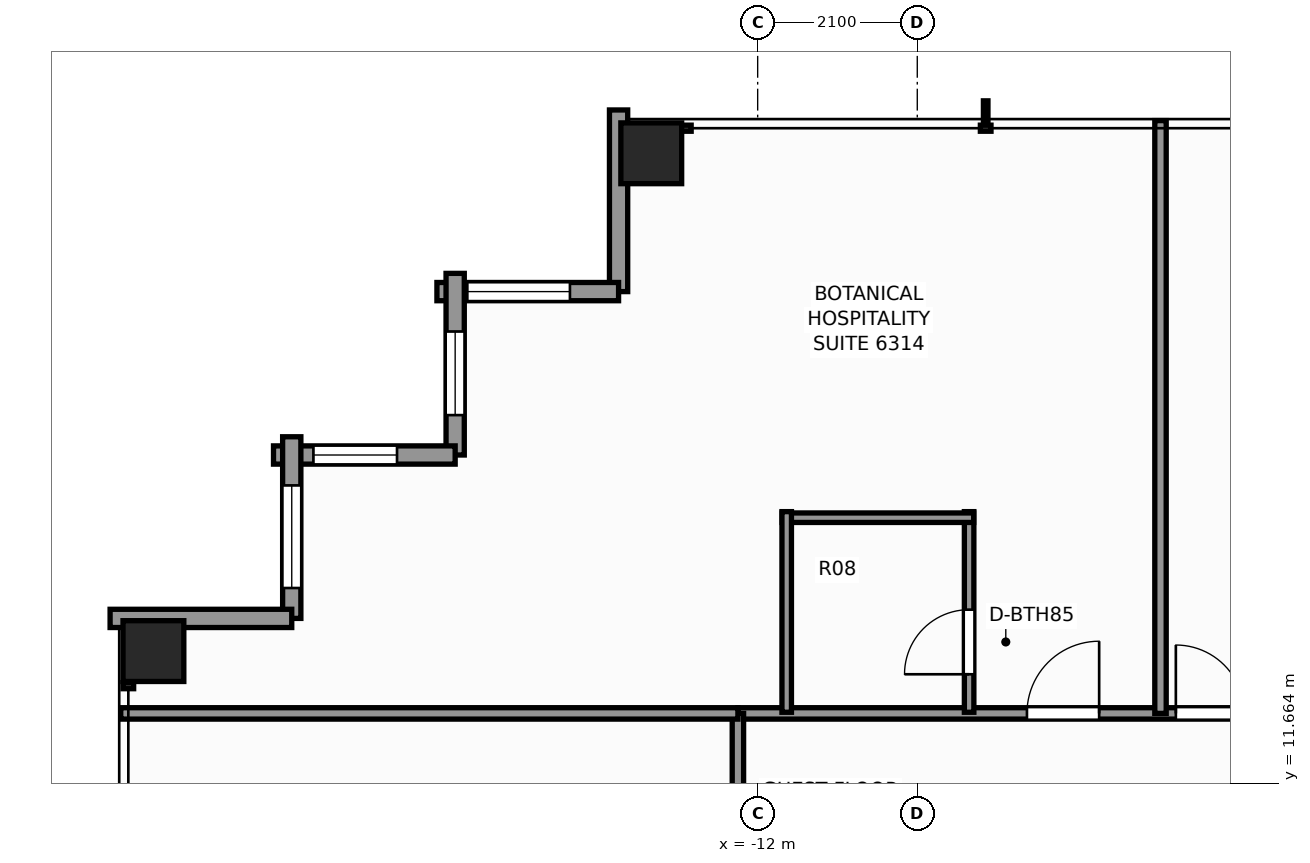
"""IFC4 building model, lengths in metres.
Left out: names, types, materials, properties, quantities, classifications, styles, units other than length and angle.
Written with IfcOpenShell. Run it as: python <this file> out.ifc"""

import sys

from ifc_helpers import new_model, si_unit, direction, frame, frame_2d, origin, origin_2d, place, context, subcontext, project, spatial, rectangle, extrude, element, fill, save


model = new_model("IFC4")
c1 = context("Model", 3, precision=1e-05, world=origin(), true_north=direction((0.0, 1.0)))
c2 = subcontext(c1, "Body", "Model", "MODEL_VIEW")
j1 = project(units=[si_unit("LENGTHUNIT", "METRE"), si_unit("PLANEANGLEUNIT", "RADIAN")], contexts=[c1])
p1 = place(None, origin())
s1 = spatial("IfcSite", under=j1, at=p1, CompositionType="ELEMENT")
p2 = place(p1, origin())
s2 = spatial("IfcBuilding", under=s1, at=p2, CompositionType="ELEMENT")
p3 = place(p2, frame((0.0, 0.0, 216.3)))
s3 = spatial("IfcBuildingStorey", under=s2, at=p3, CompositionType="ELEMENT", Elevation=216.3)
for number, where, z_axis, x_axis in (
    (1, (-13.4, 19.95, 0.0), (0.0, 0.0, 1.0), (1.0, 0.0, 0.0)),
    (2, (-19.95, 13.4, 0.0), (0.0, 0.0, 1.0), (1.0, 0.0, 0.0)),
):
    element("IfcColumn", number, at=place(p3, frame(where, z_axis=z_axis, x_axis=x_axis)), inside=s3, PredefinedType="COLUMN", context=c2, shape_type="SweptSolid", body=[
        extrude(rectangle(XDim=0.8, YDim=0.8, at=origin_2d()), origin(), (0.0, 0.0, 1.0), 3.3),
    ])
p4 = place(p3, frame((-13.83, 18.13, 0.0), z_axis=(0.0, 0.0, 1.0), x_axis=(0.0, 1.0, 0.0)))
e3 = element("IfcWall", 3, at=p4, inside=s3, PredefinedType="STANDARD", context=c2, shape_type="SweptSolid", body=[
    extrude(rectangle(XDim=2.39, YDim=0.24, at=frame_2d((1.195, 0.0))), origin(), (0.0, 0.0, 1.0), 2.463),
])
p5 = place(p3, frame((-16.22, 18.13, 0.0), z_axis=(0.0, 0.0, 1.0), x_axis=(1.0, 0.0, 0.0)))
e4 = element("IfcWall", 4, at=p5, inside=s3, PredefinedType="STANDARD", context=c2, shape_type="SweptSolid", body=[
    extrude(rectangle(XDim=2.39, YDim=0.24, at=frame_2d((1.195, 0.0))), origin(), (0.0, 0.0, 1.0), 2.463),
])
p6 = place(p5, frame((0.4, 0.0, 0.65)))
e5 = element("IfcOpeningElement", 5, at=p6, cuts=e4, PredefinedType="OPENING", context=c2, shape_type="SweptSolid", body=[
    extrude(rectangle(XDim=1.35, YDim=1.55, at=frame_2d((0.675, 0.775))), frame((0.0, 0.13, 0.0), z_axis=(0.0, -1.0, 0.0), x_axis=(1.0, 0.0, 0.0)), (0.0, 0.0, 1.0), 0.26),
])
p7 = place(p3, frame((-15.98, 15.98, 0.0), z_axis=(0.0, 0.0, 1.0), x_axis=(0.0, 1.0, 0.0)))
e6 = element("IfcWall", 6, at=p7, inside=s3, PredefinedType="STANDARD", context=c2, shape_type="SweptSolid", body=[
    extrude(rectangle(XDim=2.39, YDim=0.24, at=frame_2d((1.195, 0.0))), origin(), (0.0, 0.0, 1.0), 2.463),
])
p8 = place(p7, frame((0.525, 0.0, 0.65)))
e7 = element("IfcOpeningElement", 7, at=p8, cuts=e6, PredefinedType="OPENING", context=c2, shape_type="SweptSolid", body=[
    extrude(rectangle(XDim=1.1, YDim=1.45, at=frame_2d((0.55, 0.725))), frame((0.0, 0.13, 0.0), z_axis=(0.0, -1.0, 0.0), x_axis=(1.0, 0.0, 0.0)), (0.0, 0.0, 1.0), 0.26),
])
p9 = place(p3, frame((-18.37, 15.98, 0.0), z_axis=(0.0, 0.0, 1.0), x_axis=(1.0, 0.0, 0.0)))
e8 = element("IfcWall", 8, at=p9, inside=s3, PredefinedType="STANDARD", context=c2, shape_type="SweptSolid", body=[
    extrude(rectangle(XDim=2.39, YDim=0.24, at=frame_2d((1.195, 0.0))), origin(), (0.0, 0.0, 1.0), 2.463),
])
p10 = place(p9, frame((0.525, 0.0, 0.65)))
e9 = element("IfcOpeningElement", 9, at=p10, cuts=e8, PredefinedType="OPENING", context=c2, shape_type="SweptSolid", body=[
    extrude(rectangle(XDim=1.1, YDim=1.45, at=frame_2d((0.55, 0.725))), frame((0.0, 0.13, 0.0), z_axis=(0.0, -1.0, 0.0), x_axis=(1.0, 0.0, 0.0)), (0.0, 0.0, 1.0), 0.26),
])
p11 = place(p3, frame((-18.13, 13.83, 0.0), z_axis=(0.0, 0.0, 1.0), x_axis=(0.0, 1.0, 0.0)))
e10 = element("IfcWall", 10, at=p11, inside=s3, PredefinedType="STANDARD", context=c2, shape_type="SweptSolid", body=[
    extrude(rectangle(XDim=2.39, YDim=0.24, at=frame_2d((1.195, 0.0))), origin(), (0.0, 0.0, 1.0), 2.463),
])
p12 = place(p11, frame((0.4, 0.0, 0.65)))
e11 = element("IfcOpeningElement", 11, at=p12, cuts=e10, PredefinedType="OPENING", context=c2, shape_type="SweptSolid", body=[
    extrude(rectangle(XDim=1.35, YDim=1.55, at=frame_2d((0.675, 0.775))), frame((0.0, 0.13, 0.0), z_axis=(0.0, -1.0, 0.0), x_axis=(1.0, 0.0, 0.0)), (0.0, 0.0, 1.0), 0.26),
])
p13 = place(p3, frame((-20.52, 13.83, 0.0), z_axis=(0.0, 0.0, 1.0), x_axis=(1.0, 0.0, 0.0)))
e12 = element("IfcWall", 12, at=p13, inside=s3, PredefinedType="STANDARD", context=c2, shape_type="SweptSolid", body=[
    extrude(rectangle(XDim=2.39, YDim=0.24, at=frame_2d((1.195, 0.0))), origin(), (0.0, 0.0, 1.0), 2.463),
])
p14 = place(p3, frame((-12.26, 12.58, 0.0), z_axis=(0.0, 0.0, 1.0), x_axis=(1.0, 0.0, 0.0)))
e13 = element("IfcWall", 13, at=p14, inside=s3, PredefinedType="PARTITIONING", context=c2, shape_type="SweptSolid", body=[
    extrude(rectangle(XDim=24.52, YDim=0.15, at=frame_2d((12.26, 0.0))), origin(), (0.0, 0.0, 1.0), 2.369),
])
p15 = place(p14, frame((3.803, 0.0, 0.0)))
e14 = element("IfcOpeningElement", 14, at=p15, cuts=e13, PredefinedType="OPENING", context=c2, shape_type="SweptSolid", body=[
    extrude(rectangle(XDim=0.95, YDim=2.06, at=frame_2d((0.475, 1.03))), frame((0.0, 0.085, 0.0), z_axis=(0.0, -1.0, 0.0), x_axis=(1.0, 0.0, 0.0)), (0.0, 0.0, 1.0), 0.17),
])
p16 = place(p14, frame((5.762, 0.0, 0.0)))
e15 = element("IfcOpeningElement", 15, at=p16, cuts=e13, PredefinedType="OPENING", context=c2, shape_type="SweptSolid", body=[
    extrude(rectangle(XDim=0.9, YDim=2.06, at=frame_2d((0.45, 1.03))), frame((0.0, 0.085, 0.0), z_axis=(0.0, -1.0, 0.0), x_axis=(1.0, 0.0, 0.0)), (0.0, 0.0, 1.0), 0.17),
])
p17 = place(p14, frame((13.518, 0.0, 0.0)))
e16 = element("IfcOpeningElement", 16, at=p17, cuts=e13, PredefinedType="OPENING", context=c2, shape_type="SweptSolid", body=[
    extrude(rectangle(XDim=0.95, YDim=2.06, at=frame_2d((0.475, 1.03))), frame((0.0, 0.085, 0.0), z_axis=(0.0, -1.0, 0.0), x_axis=(1.0, 0.0, 0.0)), (0.0, 0.0, 1.0), 0.17),
])
p18 = place(p14, frame((17.858, 0.0, 0.0)))
e17 = element("IfcOpeningElement", 17, at=p18, cuts=e13, PredefinedType="OPENING", context=c2, shape_type="SweptSolid", body=[
    extrude(rectangle(XDim=0.9, YDim=2.06, at=frame_2d((0.45, 1.03))), frame((0.0, 0.085, 0.0), z_axis=(0.0, -1.0, 0.0), x_axis=(1.0, 0.0, 0.0)), (0.0, 0.0, 1.0), 0.17),
])
p19 = place(p14, frame((19.767, 0.0, 0.0)))
e18 = element("IfcOpeningElement", 18, at=p19, cuts=e13, PredefinedType="OPENING", context=c2, shape_type="SweptSolid", body=[
    extrude(rectangle(XDim=0.95, YDim=2.06, at=frame_2d((0.475, 1.03))), frame((0.0, 0.085, 0.0), z_axis=(0.0, -1.0, 0.0), x_axis=(1.0, 0.0, 0.0)), (0.0, 0.0, 1.0), 0.17),
])
p20 = place(p3, frame((-12.26, -12.26, 0.0), z_axis=(0.0, 0.0, 1.0), x_axis=(0.0, 1.0, 0.0)))
e19 = element("IfcWall", 19, at=p20, inside=s3, PredefinedType="PARTITIONING", context=c2, shape_type="SweptSolid", body=[
    extrude(rectangle(XDim=24.84, YDim=0.15, at=frame_2d((12.42, 0.0))), origin(), (0.0, 0.0, 1.0), 2.369),
])
p21 = place(p20, frame((2.944, 0.0, 0.0)))
e20 = element("IfcOpeningElement", 20, at=p21, cuts=e19, PredefinedType="OPENING", context=c2, shape_type="SweptSolid", body=[
    extrude(rectangle(XDim=0.9, YDim=2.06, at=frame_2d((0.45, 1.03))), frame((0.0, 0.085, 0.0), z_axis=(0.0, -1.0, 0.0), x_axis=(1.0, 0.0, 0.0)), (0.0, 0.0, 1.0), 0.17),
])
p22 = place(p20, frame((4.832, 0.0, 0.0)))
e21 = element("IfcOpeningElement", 21, at=p22, cuts=e19, PredefinedType="OPENING", context=c2, shape_type="SweptSolid", body=[
    extrude(rectangle(XDim=0.95, YDim=2.06, at=frame_2d((0.475, 1.03))), frame((0.0, 0.085, 0.0), z_axis=(0.0, -1.0, 0.0), x_axis=(1.0, 0.0, 0.0)), (0.0, 0.0, 1.0), 0.17),
])
p23 = place(p20, frame((14.418, 0.0, 0.0)))
e22 = element("IfcOpeningElement", 22, at=p23, cuts=e19, PredefinedType="OPENING", context=c2, shape_type="SweptSolid", body=[
    extrude(rectangle(XDim=0.95, YDim=2.06, at=frame_2d((0.475, 1.03))), frame((0.0, 0.085, 0.0), z_axis=(0.0, -1.0, 0.0), x_axis=(1.0, 0.0, 0.0)), (0.0, 0.0, 1.0), 0.17),
])
p24 = place(p20, frame((20.492, 0.0, 0.0)))
e23 = element("IfcOpeningElement", 23, at=p24, cuts=e19, PredefinedType="OPENING", context=c2, shape_type="SweptSolid", body=[
    extrude(rectangle(XDim=0.95, YDim=2.06, at=frame_2d((0.475, 1.03))), frame((0.0, 0.085, 0.0), z_axis=(0.0, -1.0, 0.0), x_axis=(1.0, 0.0, 0.0)), (0.0, 0.0, 1.0), 0.17),
])
p25 = place(p3, frame((-20.38, 12.58, 0.0), z_axis=(0.0, 0.0, 1.0), x_axis=(1.0, 0.0, 0.0)))
e24 = element("IfcWall", 24, at=p25, inside=s3, PredefinedType="PARTITIONING", context=c2, shape_type="SweptSolid", body=[
    extrude(rectangle(XDim=8.12, YDim=0.15, at=frame_2d((4.06, 0.0))), origin(), (0.0, 0.0, 1.0), 2.369),
])
p26 = place(p3, frame((-6.7, 12.58, 0.0), z_axis=(0.0, 0.0, 1.0), x_axis=(0.0, 1.0, 0.0)))
e25 = element("IfcWall", 25, at=p26, inside=s3, PredefinedType="PARTITIONING", context=c2, shape_type="SweptSolid", body=[
    extrude(rectangle(XDim=7.8, YDim=0.15, at=frame_2d((3.9, 0.0))), origin(), (0.0, 0.0, 1.0), 2.453),
])
p27 = place(p3, frame((-9.218, 12.595, 0.0), z_axis=(0.0, 0.0, 1.0), x_axis=(0.0, 1.0, 0.0)))
e26 = element("IfcWall", 26, at=p27, inside=s3, PredefinedType="PARTITIONING", context=c2, shape_type="SweptSolid", body=[
    extrude(rectangle(XDim=2.64, YDim=0.125, at=frame_2d((1.32, 0.0))), origin(), (0.0, 0.0, 1.0), 3.08),
])
p28 = place(p27, frame((0.5, 0.0, 0.0)))
e27 = element("IfcOpeningElement", 27, at=p28, cuts=e26, PredefinedType="OPENING", context=c2, shape_type="SweptSolid", body=[
    extrude(rectangle(XDim=0.85, YDim=2.03, at=frame_2d((0.425, 1.015))), frame((0.0, 0.073, 0.0), z_axis=(0.0, -1.0, 0.0), x_axis=(1.0, 0.0, 0.0)), (0.0, 0.0, 1.0), 0.145),
])
p29 = place(p3, frame((-11.678, 15.155, 0.0), z_axis=(0.0, 0.0, 1.0), x_axis=(1.0, 0.0, 0.0)))
e28 = element("IfcWall", 28, at=p29, inside=s3, PredefinedType="PARTITIONING", context=c2, shape_type="SweptSolid", body=[
    extrude(rectangle(XDim=2.52, YDim=0.125, at=frame_2d((1.26, 0.0))), origin(), (0.0, 0.0, 1.0), 2.369),
])
p30 = place(p3, frame((-11.618, 12.595, 0.0), z_axis=(0.0, 0.0, 1.0), x_axis=(0.0, 1.0, 0.0)))
e29 = element("IfcWall", 29, at=p30, inside=s3, PredefinedType="PARTITIONING", context=c2, shape_type="SweptSolid", body=[
    extrude(rectangle(XDim=2.64, YDim=0.125, at=frame_2d((1.32, 0.0))), origin(), (0.0, 0.0, 1.0), 2.369),
])
p31 = place(p6, origin())
e30 = element("IfcWindow", 30, at=p31, inside=s3, PartitioningType="SINGLE_PANEL", PredefinedType="WINDOW", context=c2, shape_type="SweptSolid", body=[
    extrude(rectangle(XDim=1.35, YDim=1.55, at=frame_2d((0.675, 0.775))), frame((0.0, 0.03, 0.0), z_axis=(0.0, -1.0, 0.0), x_axis=(1.0, 0.0, 0.0)), (0.0, 0.0, 1.0), 0.06),
])
fill(e5, e30)
p32 = place(p8, origin())
e31 = element("IfcWindow", 31, at=p32, inside=s3, PartitioningType="SINGLE_PANEL", PredefinedType="WINDOW", context=c2, shape_type="SweptSolid", body=[
    extrude(rectangle(XDim=1.1, YDim=1.45, at=frame_2d((0.55, 0.725))), frame((0.0, 0.03, 0.0), z_axis=(0.0, -1.0, 0.0), x_axis=(1.0, 0.0, 0.0)), (0.0, 0.0, 1.0), 0.06),
])
fill(e7, e31)
p33 = place(p10, origin())
e32 = element("IfcWindow", 32, at=p33, inside=s3, PartitioningType="SINGLE_PANEL", PredefinedType="WINDOW", context=c2, shape_type="SweptSolid", body=[
    extrude(rectangle(XDim=1.1, YDim=1.45, at=frame_2d((0.55, 0.725))), frame((0.0, 0.03, 0.0), z_axis=(0.0, -1.0, 0.0), x_axis=(1.0, 0.0, 0.0)), (0.0, 0.0, 1.0), 0.06),
])
fill(e9, e32)
p34 = place(p12, origin())
e33 = element("IfcWindow", 33, at=p34, inside=s3, PartitioningType="SINGLE_PANEL", PredefinedType="WINDOW", context=c2, shape_type="SweptSolid", body=[
    extrude(rectangle(XDim=1.35, YDim=1.55, at=frame_2d((0.675, 0.775))), frame((0.0, 0.03, 0.0), z_axis=(0.0, -1.0, 0.0), x_axis=(1.0, 0.0, 0.0)), (0.0, 0.0, 1.0), 0.06),
])
fill(e11, e33)
p35 = place(p28, origin())
e34 = element("IfcDoor", 34, at=p35, inside=s3, OperationType="SINGLE_SWING_LEFT", PredefinedType="DOOR", context=c2, shape_type="SweptSolid", body=[
    extrude(rectangle(XDim=0.85, YDim=2.03, at=frame_2d((0.425, 1.015))), frame((0.0, 0.025, 0.0), z_axis=(0.0, -1.0, 0.0), x_axis=(1.0, 0.0, 0.0)), (0.0, 0.0, 1.0), 0.05),
])
fill(e27, e34)
p36 = place(p15, origin())
e35 = element("IfcDoor", 35, at=p36, inside=s3, OperationType="SINGLE_SWING_RIGHT", PredefinedType="DOOR", context=c2, shape_type="SweptSolid", body=[
    extrude(rectangle(XDim=0.95, YDim=2.06, at=frame_2d((0.475, 1.03))), frame((0.0, 0.025, 0.0), z_axis=(0.0, -1.0, 0.0), x_axis=(1.0, 0.0, 0.0)), (0.0, 0.0, 1.0), 0.05),
])
fill(e14, e35)
p37 = place(p16, origin())
e36 = element("IfcDoor", 36, at=p37, inside=s3, OperationType="SINGLE_SWING_LEFT", PredefinedType="DOOR", context=c2, shape_type="SweptSolid", body=[
    extrude(rectangle(XDim=0.9, YDim=2.06, at=frame_2d((0.45, 1.03))), frame((0.0, 0.025, 0.0), z_axis=(0.0, -1.0, 0.0), x_axis=(1.0, 0.0, 0.0)), (0.0, 0.0, 1.0), 0.05),
])
fill(e15, e36)
save(model, sys.argv[1])
